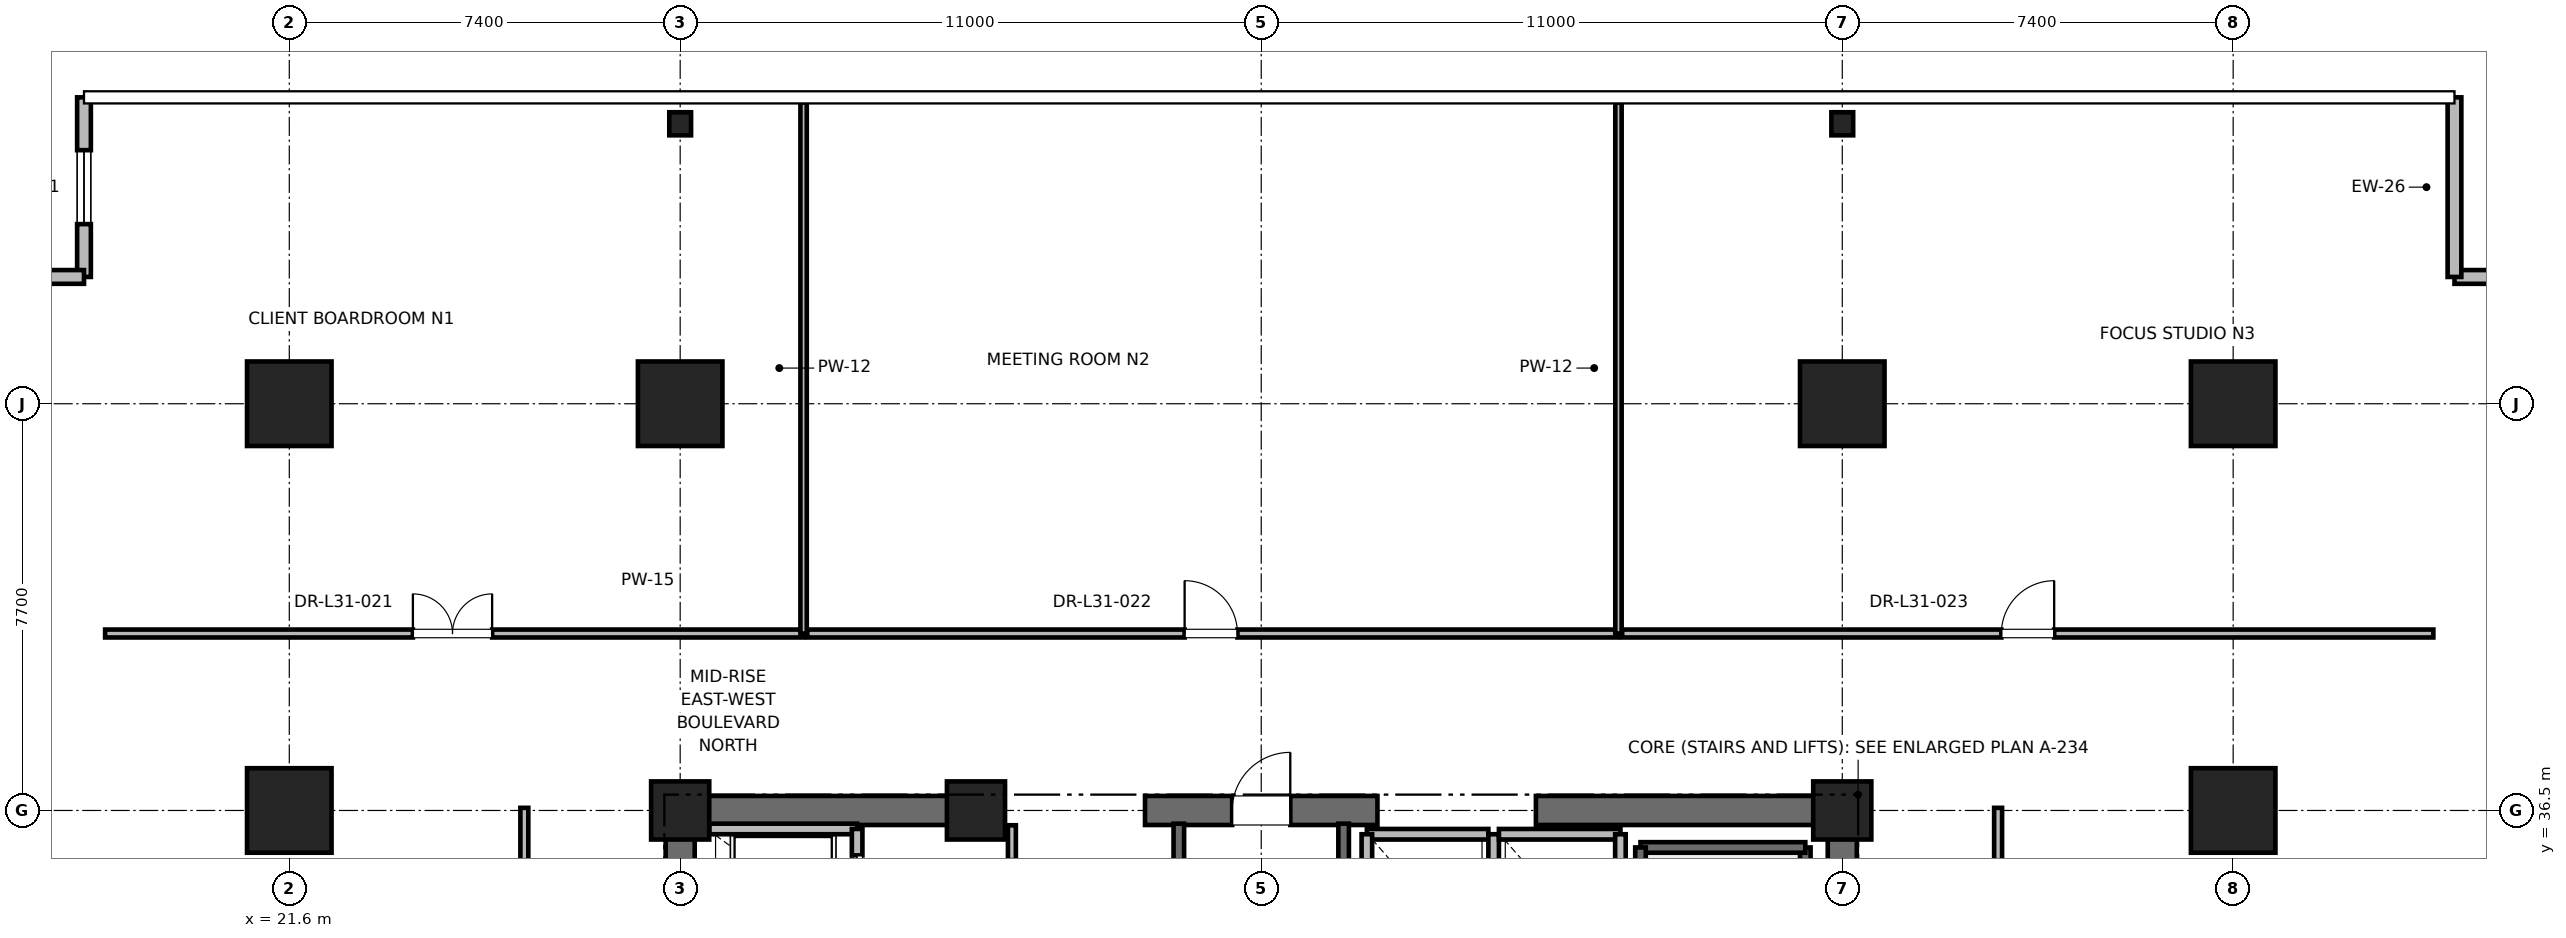
"""IFC4 building model, lengths in metres.
Left out: names, types, materials, properties, quantities, classifications, styles, units other than length and angle.
Written with IfcOpenShell. Run it as: python <this file> out.ifc"""

import sys

from ifc_helpers import new_model, si_unit, direction, frame, frame_2d, origin, origin_2d, place, context, subcontext, project, spatial, rectangle, i_section, extrude, element, fill, save


model = new_model("IFC4")
c1 = context("Model", 3, precision=1e-05, world=origin(), true_north=direction((0.0, 1.0)))
c2 = subcontext(c1, "Body", "Model", "MODEL_VIEW")
j1 = project(units=[si_unit("LENGTHUNIT", "METRE"), si_unit("PLANEANGLEUNIT", "RADIAN")], contexts=[c1])
p1 = place(None, origin())
s1 = spatial("IfcSite", under=j1, at=p1, CompositionType="ELEMENT")
p2 = place(p1, origin())
s2 = spatial("IfcBuilding", under=s1, at=p2, CompositionType="ELEMENT")
p3 = place(p2, frame((0.0, 0.0, 136.4)))
s3 = spatial("IfcBuildingStorey", under=s2, at=p3, CompositionType="ELEMENT", Elevation=136.4)
for number, where, z_axis, x_axis in (
    (1, (29.0, 44.2, 0.0), (0.0, 0.0, 1.0), (1.0, 0.0, 0.0)),
    (2, (51.0, 44.2, 0.0), (0.0, 0.0, 1.0), (1.0, 0.0, 0.0)),
    (3, (21.6, 36.5, 0.0), (0.0, 0.0, 1.0), (1.0, 0.0, 0.0)),
    (4, (58.4, 36.5, 0.0), (0.0, 0.0, 1.0), (1.0, 0.0, 0.0)),
    (5, (21.6, 44.2, 0.0), (0.0, 0.0, 1.0), (1.0, 0.0, 0.0)),
    (6, (58.4, 44.2, 0.0), (0.0, 0.0, 1.0), (1.0, 0.0, 0.0)),
):
    element("IfcColumn", number, at=place(p3, frame(where, z_axis=z_axis, x_axis=x_axis)), inside=s3, PredefinedType="COLUMN", context=c2, shape_type="SweptSolid", body=[
        extrude(rectangle(XDim=1.6, YDim=1.6, at=origin_2d()), origin(), (0.0, 0.0, 1.0), 4.0),
    ])
for number, where, z_axis, x_axis in (
    (7, (29.0, 49.5, 0.0), (0.0, 0.0, 1.0), (1.0, 0.0, 0.0)),
    (8, (51.0, 49.5, 0.0), (0.0, 0.0, 1.0), (1.0, 0.0, 0.0)),
):
    element("IfcColumn", number, at=place(p3, frame(where, z_axis=z_axis, x_axis=x_axis)), inside=s3, PredefinedType="COLUMN", context=c2, shape_type="SweptSolid", body=[
        extrude(i_section(OverallWidth=0.412, OverallDepth=0.437, WebThickness=0.036, FlangeThickness=0.058, FilletRadius=0.015, at=origin_2d()), origin(), (0.0, 0.0, 1.0), 4.0),
    ])
for number, where, z_axis, x_axis in (
    (9, (29.0, 36.5, 0.0), (0.0, 0.0, 1.0), (1.0, 0.0, 0.0)),
    (10, (51.0, 36.5, 0.0), (0.0, 0.0, 1.0), (1.0, 0.0, 0.0)),
    (11, (34.6, 36.5, 0.0), (0.0, 0.0, 1.0), (1.0, 0.0, 0.0)),
):
    element("IfcColumn", number, at=place(p3, frame(where, z_axis=z_axis, x_axis=x_axis)), inside=s3, PredefinedType="PILASTER", context=c2, shape_type="SweptSolid", body=[
        extrude(rectangle(XDim=1.1, YDim=1.1, at=origin_2d()), origin(), (0.0, 0.0, 1.0), 4.0),
    ])
p4 = place(p3, frame((29.0, 36.5, 0.0), z_axis=(0.0, 0.0, 1.0), x_axis=(1.0, 0.0, 0.0)))
e12 = element("IfcWall", 12, at=p4, inside=s3, PredefinedType="SHEAR", context=c2, shape_type="SweptSolid", body=[
    extrude(rectangle(XDim=5.8, YDim=0.55, at=frame_2d((2.9, 0.0))), origin(), (0.0, 0.0, 1.0), 3.775),
])
p5 = place(p3, frame((37.8, 36.5, 0.0), z_axis=(0.0, 0.0, 1.0), x_axis=(1.0, 0.0, 0.0)))
e13 = element("IfcWall", 13, at=p5, inside=s3, PredefinedType="SHEAR", context=c2, shape_type="SweptSolid", body=[
    extrude(rectangle(XDim=4.4, YDim=0.55, at=frame_2d((2.2, 0.0))), origin(), (0.0, 0.0, 1.0), 3.775),
])
p6 = place(p5, frame((1.65, 0.0, 0.0)))
e14 = element("IfcOpeningElement", 14, at=p6, cuts=e13, PredefinedType="OPENING", context=c2, shape_type="SweptSolid", body=[
    extrude(rectangle(XDim=1.1, YDim=2.15, at=frame_2d((0.55, 1.075))), frame((0.0, 0.275, 0.0), z_axis=(0.0, -1.0, 0.0), x_axis=(1.0, 0.0, 0.0)), (0.0, 0.0, 1.0), 0.55),
])
for number, where, z_axis, x_axis in (
    (15, (45.2, 36.5, 0.0), (0.0, 0.0, 1.0), (1.0, 0.0, 0.0)),
    (16, (29.0, 30.7, 0.0), (0.0, 0.0, 1.0), (0.0, 1.0, 0.0)),
):
    element("IfcWall", number, at=place(p3, frame(where, z_axis=z_axis, x_axis=x_axis)), inside=s3, PredefinedType="SHEAR", context=c2, shape_type="SweptSolid", body=[
        extrude(rectangle(XDim=5.8, YDim=0.55, at=frame_2d((2.9, 0.0))), origin(), (0.0, 0.0, 1.0), 3.775),
    ])
p7 = place(p3, frame((51.0, 27.7, 0.0), z_axis=(0.0, 0.0, 1.0), x_axis=(0.0, 1.0, 0.0)))
e17 = element("IfcWall", 17, at=p7, inside=s3, PredefinedType="SHEAR", context=c2, shape_type="SweptSolid", body=[
    extrude(rectangle(XDim=8.8, YDim=0.55, at=frame_2d((4.4, 0.0))), origin(), (0.0, 0.0, 1.0), 3.775),
])
p8 = place(p3, frame((66.39, 46.601, 0.0), z_axis=(0.0, 0.0, 1.0), x_axis=(-1.0, 0.0, 0.0)))
e18 = element("IfcWall", 18, at=p8, inside=s3, PredefinedType="PARAPET", context=c2, shape_type="SweptSolid", body=[
    extrude(rectangle(XDim=3.8, YDim=0.26, at=frame_2d((1.9, 0.0))), origin(), (0.0, 0.0, 1.0), 3.775),
])
p9 = place(p8, frame((1.2, 0.0, 0.85)))
e19 = element("IfcOpeningElement", 19, at=p9, cuts=e18, PredefinedType="OPENING", context=c2, shape_type="SweptSolid", body=[
    extrude(rectangle(XDim=1.4, YDim=2.0, at=frame_2d((0.7, 1.0))), frame((0.0, 0.13, 0.0), z_axis=(0.0, -1.0, 0.0), x_axis=(1.0, 0.0, 0.0)), (0.0, 0.0, 1.0), 0.26),
])
p10 = place(p3, frame((62.59, 46.601, 0.0), z_axis=(0.0, 0.0, 1.0), x_axis=(0.0, 1.0, 0.0)))
e20 = element("IfcWall", 20, at=p10, inside=s3, PredefinedType="PARAPET", context=c2, shape_type="SweptSolid", body=[
    extrude(rectangle(XDim=3.4, YDim=0.26, at=frame_2d((1.7, 0.0))), origin(), (0.0, 0.0, 1.0), 3.775),
])
p11 = place(p3, frame((17.714, 50.0, 0.0), z_axis=(0.0, 0.0, 1.0), x_axis=(0.0, -1.0, 0.0)))
e21 = element("IfcWall", 21, at=p11, inside=s3, PredefinedType="PARAPET", context=c2, shape_type="SweptSolid", body=[
    extrude(rectangle(XDim=3.4, YDim=0.26, at=frame_2d((1.7, 0.0))), origin(), (0.0, 0.0, 1.0), 3.775),
])
p12 = place(p11, frame((1.0, 0.0, 0.85)))
e22 = element("IfcOpeningElement", 22, at=p12, cuts=e21, PredefinedType="OPENING", context=c2, shape_type="SweptSolid", body=[
    extrude(rectangle(XDim=1.4, YDim=2.0, at=frame_2d((0.7, 1.0))), frame((0.0, 0.13, 0.0), z_axis=(0.0, -1.0, 0.0), x_axis=(1.0, 0.0, 0.0)), (0.0, 0.0, 1.0), 0.26),
])
p13 = place(p3, frame((17.714, 46.601, 0.0), z_axis=(0.0, 0.0, 1.0), x_axis=(-1.0, 0.0, 0.0)))
e23 = element("IfcWall", 23, at=p13, inside=s3, PredefinedType="PARAPET", context=c2, shape_type="SweptSolid", body=[
    extrude(rectangle(XDim=3.8, YDim=0.26, at=frame_2d((1.9, 0.0))), origin(), (0.0, 0.0, 1.0), 3.775),
])
p14 = place(p3, frame((50.3, 27.65, 0.0), z_axis=(0.0, 0.0, 1.0), x_axis=(0.0, 1.0, 0.0)))
e24 = element("IfcWall", 24, at=p14, inside=s3, PredefinedType="SOLIDWALL", context=c2, shape_type="SweptSolid", body=[
    extrude(rectangle(XDim=8.15, YDim=0.2, at=frame_2d((4.075, 0.0))), origin(), (0.0, 0.0, 1.0), 3.775),
])
p15 = place(p3, frame((47.18, 35.8, 0.0), z_axis=(0.0, 0.0, 1.0), x_axis=(1.0, 0.0, 0.0)))
e25 = element("IfcWall", 25, at=p15, inside=s3, PredefinedType="SOLIDWALL", context=c2, shape_type="SweptSolid", body=[
    extrude(rectangle(XDim=3.12, YDim=0.2, at=frame_2d((1.56, 0.0))), origin(), (0.0, 0.0, 1.0), 3.775),
])
p16 = place(p3, frame((47.18, 27.62, 0.0), z_axis=(0.0, 0.0, 1.0), x_axis=(0.0, 1.0, 0.0)))
e26 = element("IfcWall", 26, at=p16, inside=s3, PredefinedType="SOLIDWALL", context=c2, shape_type="SweptSolid", body=[
    extrude(rectangle(XDim=8.18, YDim=0.2, at=frame_2d((4.09, 0.0))), origin(), (0.0, 0.0, 1.0), 3.775),
])
p17 = place(p3, frame((38.44, 27.38, 0.0), z_axis=(0.0, 0.0, 1.0), x_axis=(0.0, 1.0, 0.0)))
e27 = element("IfcWall", 27, at=p17, inside=s3, PredefinedType="SOLIDWALL", context=c2, shape_type="SweptSolid", body=[
    extrude(rectangle(XDim=8.87, YDim=0.2, at=frame_2d((4.435, 0.0))), origin(), (0.0, 0.0, 1.0), 3.775),
])
p18 = place(p3, frame((41.56, 27.68, 0.0), z_axis=(0.0, 0.0, 1.0), x_axis=(0.0, 1.0, 0.0)))
e28 = element("IfcWall", 28, at=p18, inside=s3, PredefinedType="SOLIDWALL", context=c2, shape_type="SweptSolid", body=[
    extrude(rectangle(XDim=8.57, YDim=0.2, at=frame_2d((4.285, 0.0))), origin(), (0.0, 0.0, 1.0), 3.775),
])
p19 = place(p3, frame((32.35, 36.15, 0.0), z_axis=(0.0, 0.0, 1.0), x_axis=(-1.0, 0.0, 0.0)))
e29 = element("IfcWall", 29, at=p19, inside=s3, PredefinedType="SOLIDWALL", context=c2, shape_type="SweptSolid", body=[
    extrude(rectangle(XDim=2.8, YDim=0.2, at=frame_2d((1.4, 0.0))), origin(), (0.0, 0.0, 1.0), 2.985),
])
p20 = place(p3, frame((32.35, 34.05, 0.0), z_axis=(0.0, 0.0, 1.0), x_axis=(0.0, 1.0, 0.0)))
e30 = element("IfcWall", 30, at=p20, inside=s3, PredefinedType="SOLIDWALL", context=c2, shape_type="SweptSolid", body=[
    extrude(rectangle(XDim=2.1, YDim=0.2, at=frame_2d((1.05, 0.0))), origin(), (0.0, 0.0, 1.0), 3.775),
])
p21 = place(p20, frame((0.5, 0.0, 0.0)))
e31 = element("IfcOpeningElement", 31, at=p21, cuts=e30, PredefinedType="OPENING", context=c2, shape_type="SweptSolid", body=[
    extrude(rectangle(XDim=1.1, YDim=2.2, at=frame_2d((0.55, 1.1))), frame((0.0, 0.1, 0.0), z_axis=(0.0, -1.0, 0.0), x_axis=(1.0, 0.0, 0.0)), (0.0, 0.0, 1.0), 0.2),
])
p22 = place(p3, frame((44.3, 36.05, 0.0), z_axis=(0.0, 0.0, 1.0), x_axis=(-1.0, 0.0, 0.0)))
e32 = element("IfcWall", 32, at=p22, inside=s3, PredefinedType="SOLIDWALL", context=c2, shape_type="SweptSolid", body=[
    extrude(rectangle(XDim=2.3, YDim=0.2, at=frame_2d((1.15, 0.0))), origin(), (0.0, 0.0, 1.0), 2.755),
])
for number, where, z_axis, x_axis in (
    (33, (42.0, 36.05, 0.0), (0.0, 0.0, 1.0), (0.0, -1.0, 0.0)),
    (34, (44.4, 33.45, 0.0), (0.0, 0.0, 1.0), (0.0, 1.0, 0.0)),
):
    element("IfcWall", number, at=place(p3, frame(where, z_axis=z_axis, x_axis=x_axis)), inside=s3, PredefinedType="SOLIDWALL", context=c2, shape_type="SweptSolid", body=[
        extrude(rectangle(XDim=2.6, YDim=0.2, at=frame_2d((1.3, 0.0))), origin(), (0.0, 0.0, 1.0), 2.755),
    ])
p23 = place(p3, frame((46.8, 36.05, 0.0), z_axis=(0.0, 0.0, 1.0), x_axis=(-1.0, 0.0, 0.0)))
e35 = element("IfcWall", 35, at=p23, inside=s3, PredefinedType="SOLIDWALL", context=c2, shape_type="SweptSolid", body=[
    extrude(rectangle(XDim=2.3, YDim=0.2, at=frame_2d((1.15, 0.0))), origin(), (0.0, 0.0, 1.0), 2.755),
])
p24 = place(p3, frame((46.8, 33.45, 0.0), z_axis=(0.0, 0.0, 1.0), x_axis=(0.0, 1.0, 0.0)))
e36 = element("IfcWall", 36, at=p24, inside=s3, PredefinedType="SOLIDWALL", context=c2, shape_type="SweptSolid", body=[
    extrude(rectangle(XDim=2.6, YDim=0.2, at=frame_2d((1.3, 0.0))), origin(), (0.0, 0.0, 1.0), 3.775),
])
p25 = place(p3, frame((35.28, 33.95, 0.0), z_axis=(0.0, 0.0, 1.0), x_axis=(0.0, 1.0, 0.0)))
e37 = element("IfcWall", 37, at=p25, inside=s3, PredefinedType="PARTITIONING", context=c2, shape_type="SweptSolid", body=[
    extrude(rectangle(XDim=2.27, YDim=0.15, at=frame_2d((1.135, 0.0))), origin(), (0.0, 0.0, 1.0), 2.755),
])
p26 = place(p25, frame((0.66, 0.0, 0.0)))
e38 = element("IfcOpeningElement", 38, at=p26, cuts=e37, PredefinedType="OPENING", context=c2, shape_type="SweptSolid", body=[
    extrude(rectangle(XDim=0.95, YDim=2.15, at=frame_2d((0.475, 1.075))), frame((0.0, 0.075, 0.0), z_axis=(0.0, -1.0, 0.0), x_axis=(1.0, 0.0, 0.0)), (0.0, 0.0, 1.0), 0.15),
])
p27 = place(p3, frame((18.114, 39.85, 0.0), z_axis=(0.0, 0.0, 1.0), x_axis=(1.0, 0.0, 0.0)))
e39 = element("IfcWall", 39, at=p27, inside=s3, PredefinedType="PARTITIONING", context=c2, shape_type="SweptSolid", body=[
    extrude(rectangle(XDim=13.223, YDim=0.15, at=frame_2d((6.611, 0.0))), origin(), (0.0, 0.0, 1.0), 2.85),
])
p28 = place(p27, frame((5.826, 0.0, 0.0)))
e40 = element("IfcOpeningElement", 40, at=p28, cuts=e39, PredefinedType="OPENING", context=c2, shape_type="SweptSolid", body=[
    extrude(rectangle(XDim=1.5, YDim=2.25, at=frame_2d((0.75, 1.125))), frame((0.0, 0.075, 0.0), z_axis=(0.0, -1.0, 0.0), x_axis=(1.0, 0.0, 0.0)), (0.0, 0.0, 1.0), 0.15),
])
p29 = place(p3, frame((31.336, 39.85, 0.0), z_axis=(0.0, 0.0, 1.0), x_axis=(0.0, 1.0, 0.0)))
e41 = element("IfcWall", 41, at=p29, inside=s3, PredefinedType="PARTITIONING", context=c2, shape_type="SweptSolid", body=[
    extrude(rectangle(XDim=10.05, YDim=0.12, at=frame_2d((5.025, 0.0))), origin(), (0.0, 0.0, 1.0), 2.405),
])
p30 = place(p3, frame((31.406, 39.85, 0.0), z_axis=(0.0, 0.0, 1.0), x_axis=(1.0, 0.0, 0.0)))
e42 = element("IfcWall", 42, at=p30, inside=s3, PredefinedType="PARTITIONING", context=c2, shape_type="SweptSolid", body=[
    extrude(rectangle(XDim=15.357, YDim=0.15, at=frame_2d((7.678, 0.0))), origin(), (0.0, 0.0, 1.0), 2.85),
])
p31 = place(p30, frame((7.143, 0.0, 0.0)))
e43 = element("IfcOpeningElement", 43, at=p31, cuts=e42, PredefinedType="OPENING", context=c2, shape_type="SweptSolid", body=[
    extrude(rectangle(XDim=1.0, YDim=2.15, at=frame_2d((0.5, 1.075))), frame((0.0, 0.075, 0.0), z_axis=(0.0, -1.0, 0.0), x_axis=(1.0, 0.0, 0.0)), (0.0, 0.0, 1.0), 0.15),
])
p32 = place(p3, frame((46.763, 39.85, 0.0), z_axis=(0.0, 0.0, 1.0), x_axis=(0.0, 1.0, 0.0)))
e44 = element("IfcWall", 44, at=p32, inside=s3, PredefinedType="PARTITIONING", context=c2, shape_type="SweptSolid", body=[
    extrude(rectangle(XDim=10.05, YDim=0.12, at=frame_2d((5.025, 0.0))), origin(), (0.0, 0.0, 1.0), 2.405),
])
p33 = place(p3, frame((46.833, 39.85, 0.0), z_axis=(0.0, 0.0, 1.0), x_axis=(1.0, 0.0, 0.0)))
e45 = element("IfcWall", 45, at=p33, inside=s3, PredefinedType="PARTITIONING", context=c2, shape_type="SweptSolid", body=[
    extrude(rectangle(XDim=15.357, YDim=0.15, at=frame_2d((7.678, 0.0))), origin(), (0.0, 0.0, 1.0), 2.85),
])
p34 = place(p33, frame((7.178, 0.0, 0.0)))
e46 = element("IfcOpeningElement", 46, at=p34, cuts=e45, PredefinedType="OPENING", context=c2, shape_type="SweptSolid", body=[
    extrude(rectangle(XDim=1.0, YDim=2.15, at=frame_2d((0.5, 1.075))), frame((0.0, 0.075, 0.0), z_axis=(0.0, -1.0, 0.0), x_axis=(1.0, 0.0, 0.0)), (0.0, 0.0, 1.0), 0.15),
])
p35 = place(p3, frame((26.05, 18.45, 0.0), z_axis=(0.0, 0.0, 1.0), x_axis=(0.0, 1.0, 0.0)))
e47 = element("IfcWall", 47, at=p35, inside=s3, PredefinedType="PARTITIONING", context=c2, shape_type="SweptSolid", body=[
    extrude(rectangle(XDim=18.1, YDim=0.15, at=frame_2d((9.05, 0.0))), origin(), (0.0, 0.0, 1.0), 2.85),
])
p36 = place(p35, frame((8.55, 0.0, 0.0)))
e48 = element("IfcOpeningElement", 48, at=p36, cuts=e47, PredefinedType="OPENING", context=c2, shape_type="SweptSolid", body=[
    extrude(rectangle(XDim=1.0, YDim=2.15, at=frame_2d((0.5, 1.075))), frame((0.0, 0.075, 0.0), z_axis=(0.0, -1.0, 0.0), x_axis=(1.0, 0.0, 0.0)), (0.0, 0.0, 1.0), 0.15),
])
p37 = place(p3, frame((53.95, 30.828, 0.0), z_axis=(0.0, 0.0, 1.0), x_axis=(0.0, 1.0, 0.0)))
e49 = element("IfcWall", 49, at=p37, inside=s3, PredefinedType="PARTITIONING", context=c2, shape_type="SweptSolid", body=[
    extrude(rectangle(XDim=5.722, YDim=0.15, at=frame_2d((2.861, 0.0))), origin(), (0.0, 0.0, 1.0), 2.85),
])
p38 = place(p37, frame((2.036, 0.0, 0.0)))
e50 = element("IfcOpeningElement", 50, at=p38, cuts=e49, PredefinedType="OPENING", context=c2, shape_type="SweptSolid", body=[
    extrude(rectangle(XDim=1.5, YDim=2.25, at=frame_2d((0.75, 1.125))), frame((0.0, 0.075, 0.0), z_axis=(0.0, -1.0, 0.0), x_axis=(1.0, 0.0, 0.0)), (0.0, 0.0, 1.0), 0.15),
])
p39 = place(p12, origin())
e51 = element("IfcWindow", 51, at=p39, inside=s3, PartitioningType="SINGLE_PANEL", PredefinedType="WINDOW", context=c2, shape_type="SweptSolid", body=[
    extrude(rectangle(XDim=1.4, YDim=2.0, at=frame_2d((0.7, 1.0))), frame((0.0, 0.03, 0.0), z_axis=(0.0, -1.0, 0.0), x_axis=(1.0, 0.0, 0.0)), (0.0, 0.0, 1.0), 0.06),
])
fill(e22, e51)
p40 = place(p6, origin())
e52 = element("IfcDoor", 52, at=p40, inside=s3, OperationType="SINGLE_SWING_RIGHT", PredefinedType="DOOR", context=c2, shape_type="SweptSolid", body=[
    extrude(rectangle(XDim=1.1, YDim=2.15, at=frame_2d((0.55, 1.075))), frame((0.0, 0.025, 0.0), z_axis=(0.0, -1.0, 0.0), x_axis=(1.0, 0.0, 0.0)), (0.0, 0.0, 1.0), 0.05),
])
fill(e14, e52)
p41 = place(p21, origin())
e53 = element("IfcDoor", 53, at=p41, inside=s3, OperationType="SLIDING_TO_RIGHT", PredefinedType="DOOR", context=c2, shape_type="SweptSolid", body=[
    extrude(rectangle(XDim=1.1, YDim=2.2, at=frame_2d((0.55, 1.1))), frame((0.0, 0.025, 0.0), z_axis=(0.0, -1.0, 0.0), x_axis=(1.0, 0.0, 0.0)), (0.0, 0.0, 1.0), 0.05),
])
fill(e31, e53)
p42 = place(p28, origin())
e54 = element("IfcDoor", 54, at=p42, inside=s3, OperationType="DOUBLE_DOOR_SINGLE_SWING", PredefinedType="DOOR", context=c2, shape_type="SweptSolid", body=[
    extrude(rectangle(XDim=1.5, YDim=2.25, at=frame_2d((0.75, 1.125))), frame((0.0, 0.025, 0.0), z_axis=(0.0, -1.0, 0.0), x_axis=(1.0, 0.0, 0.0)), (0.0, 0.0, 1.0), 0.05),
])
fill(e40, e54)
p43 = place(p31, origin())
e55 = element("IfcDoor", 55, at=p43, inside=s3, OperationType="SINGLE_SWING_LEFT", PredefinedType="DOOR", context=c2, shape_type="SweptSolid", body=[
    extrude(rectangle(XDim=1.0, YDim=2.15, at=frame_2d((0.5, 1.075))), frame((0.0, 0.025, 0.0), z_axis=(0.0, -1.0, 0.0), x_axis=(1.0, 0.0, 0.0)), (0.0, 0.0, 1.0), 0.05),
])
fill(e43, e55)
p44 = place(p34, origin())
e56 = element("IfcDoor", 56, at=p44, inside=s3, OperationType="SINGLE_SWING_RIGHT", PredefinedType="DOOR", context=c2, shape_type="SweptSolid", body=[
    extrude(rectangle(XDim=1.0, YDim=2.15, at=frame_2d((0.5, 1.075))), frame((0.0, 0.025, 0.0), z_axis=(0.0, -1.0, 0.0), x_axis=(1.0, 0.0, 0.0)), (0.0, 0.0, 1.0), 0.05),
])
fill(e46, e56)
save(model, sys.argv[1])
